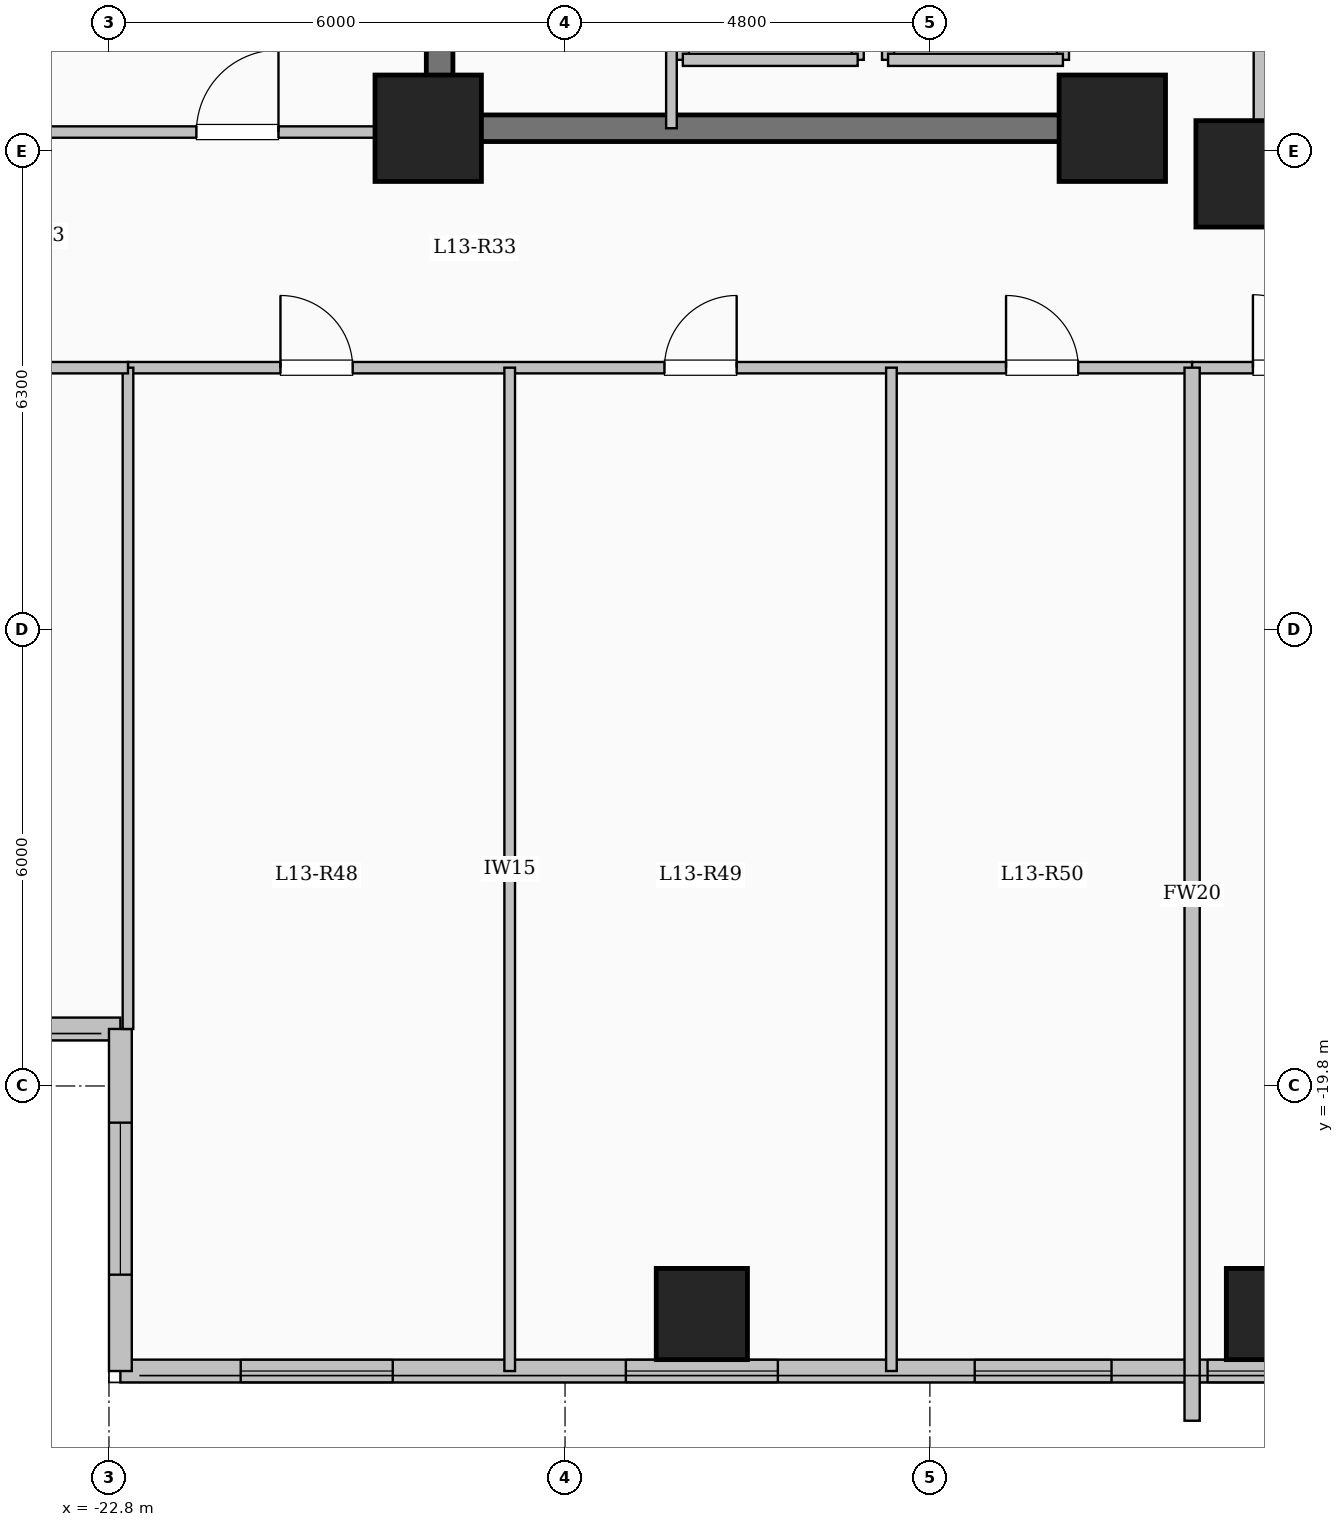
"""IFC4 building model, lengths in metres.
Left out: names, types, materials, properties, quantities, classifications, styles, units other than length and angle.
Written with IfcOpenShell. Run it as: python <this file> out.ifc"""

import sys

from ifc_helpers import new_model, si_unit, direction, frame, frame_2d, origin, origin_2d, place, context, subcontext, project, spatial, rectangle, extrude, element, fill, save


model = new_model("IFC4")
c1 = context("Model", 3, precision=1e-05, world=origin(), true_north=direction((0.0, 1.0)))
c2 = subcontext(c1, "Body", "Model", "MODEL_VIEW")
j1 = project(units=[si_unit("LENGTHUNIT", "METRE"), si_unit("PLANEANGLEUNIT", "RADIAN")], contexts=[c1])
p1 = place(None, origin())
s1 = spatial("IfcSite", under=j1, at=p1, CompositionType="ELEMENT")
p2 = place(p1, origin())
s2 = spatial("IfcBuilding", under=s1, at=p2, CompositionType="ELEMENT")
p3 = place(p2, frame((0.0, 0.0, 50.8)))
s3 = spatial("IfcBuildingStorey", under=s2, at=p3, CompositionType="ELEMENT", Elevation=50.8)
for number, where, z_axis, x_axis in (
    (1, (-7.8, -7.8, 0.0), (0.0, 0.0, 1.0), (1.0, 0.0, 0.0)),
    (2, (-9.6, -7.2, 0.0), (0.0, 0.0, 1.0), (1.0, 0.0, 0.0)),
    (3, (-18.6, -7.2, 0.0), (0.0, 0.0, 1.0), (1.0, 0.0, 0.0)),
):
    element("IfcColumn", number, at=place(p3, frame(where, z_axis=z_axis, x_axis=x_axis)), inside=s3, PredefinedType="COLUMN", context=c2, shape_type="SweptSolid", body=[
        extrude(rectangle(XDim=1.4, YDim=1.4, at=origin_2d()), origin(), (0.0, 0.0, 1.0), 3.35),
    ])
for number, where, z_axis, x_axis in (
    (4, (-15.0, -22.8, 0.0), (0.0, 0.0, 1.0), (1.0, 0.0, 0.0)),
    (5, (-7.5, -22.8, 0.0), (0.0, 0.0, 1.0), (1.0, 0.0, 0.0)),
):
    element("IfcColumn", number, at=place(p3, frame(where, z_axis=z_axis, x_axis=x_axis)), inside=s3, PredefinedType="COLUMN", context=c2, shape_type="SweptSolid", body=[
        extrude(rectangle(XDim=1.2, YDim=1.2, at=origin_2d()), origin(), (0.0, 0.0, 1.0), 3.35),
    ])
p4 = place(p3, frame((-7.62, -7.62, 0.0), z_axis=(0.0, 0.0, 1.0), x_axis=(1.0, 0.0, 0.0)))
e6 = element("IfcWall", 6, at=p4, inside=s3, PredefinedType="SOLIDWALL", context=c2, shape_type="SweptSolid", body=[
    extrude(rectangle(XDim=15.24, YDim=0.24, at=frame_2d((7.62, 0.0))), origin(), (0.0, 0.0, 1.0), 3.1),
])
p5 = place(p4, frame((6.92, 0.0, 0.95)))
e7 = element("IfcOpeningElement", 7, at=p5, cuts=e6, PredefinedType="OPENING", context=c2, shape_type="SweptSolid", body=[
    extrude(rectangle(XDim=1.4, YDim=1.5, at=frame_2d((0.7, 0.75))), frame((0.0, 0.13, 0.0), z_axis=(0.0, -1.0, 0.0), x_axis=(1.0, 0.0, 0.0)), (0.0, 0.0, 1.0), 0.26),
])
p6 = place(p3, frame((-7.62, 7.62, 0.0), z_axis=(0.0, 0.0, 1.0), x_axis=(0.0, -1.0, 0.0)))
e8 = element("IfcWall", 8, at=p6, inside=s3, PredefinedType="SOLIDWALL", context=c2, shape_type="SweptSolid", body=[
    extrude(rectangle(XDim=15.24, YDim=0.24, at=frame_2d((7.62, 0.0))), origin(), (0.0, 0.0, 1.0), 3.1),
])
p7 = place(p6, frame((6.92, 0.0, 0.95)))
e9 = element("IfcOpeningElement", 9, at=p7, cuts=e8, PredefinedType="OPENING", context=c2, shape_type="SweptSolid", body=[
    extrude(rectangle(XDim=1.4, YDim=1.5, at=frame_2d((0.7, 0.75))), frame((0.0, 0.13, 0.0), z_axis=(0.0, -1.0, 0.0), x_axis=(1.0, 0.0, 0.0)), (0.0, 0.0, 1.0), 0.26),
])
p8 = place(p3, frame((-22.65, -19.05, 0.0), z_axis=(0.0, 0.0, 1.0), x_axis=(-1.0, 0.0, 0.0)))
e10 = element("IfcWall", 10, at=p8, inside=s3, PredefinedType="SOLIDWALL", context=c2, shape_type="SweptSolid", body=[
    extrude(rectangle(XDim=6.0, YDim=0.3, at=frame_2d((3.0, 0.0))), origin(), (0.0, 0.0, 1.0), 3.1),
])
p9 = place(p8, frame((1.775, 0.0, 0.9)))
e11 = element("IfcOpeningElement", 11, at=p9, cuts=e10, PredefinedType="OPENING", context=c2, shape_type="SweptSolid", body=[
    extrude(rectangle(XDim=2.4, YDim=1.8, at=frame_2d((1.2, 0.9))), frame((0.0, 0.16, 0.0), z_axis=(0.0, -1.0, 0.0), x_axis=(1.0, 0.0, 0.0)), (0.0, 0.0, 1.0), 0.32),
])
p10 = place(p3, frame((-7.35, -23.55, 0.0), z_axis=(0.0, 0.0, 1.0), x_axis=(-1.0, 0.0, 0.0)))
e12 = element("IfcWall", 12, at=p10, inside=s3, PredefinedType="SOLIDWALL", context=c2, shape_type="SweptSolid", body=[
    extrude(rectangle(XDim=15.3, YDim=0.3, at=frame_2d((7.65, 0.0))), origin(), (0.0, 0.0, 1.0), 3.1),
])
p11 = place(p10, frame((0.147, 0.0, 0.95)))
e13 = element("IfcOpeningElement", 13, at=p11, cuts=e12, PredefinedType="OPENING", context=c2, shape_type="SweptSolid", body=[
    extrude(rectangle(XDim=0.85, YDim=1.5, at=frame_2d((0.425, 0.75))), frame((0.0, 0.16, 0.0), z_axis=(0.0, -1.0, 0.0), x_axis=(1.0, 0.0, 0.0)), (0.0, 0.0, 1.0), 0.32),
])
p12 = place(p10, frame((2.26, 0.0, 0.9)))
e14 = element("IfcOpeningElement", 14, at=p12, cuts=e12, PredefinedType="OPENING", context=c2, shape_type="SweptSolid", body=[
    extrude(rectangle(XDim=1.8, YDim=1.65, at=frame_2d((0.9, 0.825))), frame((0.0, 0.16, 0.0), z_axis=(0.0, -1.0, 0.0), x_axis=(1.0, 0.0, 0.0)), (0.0, 0.0, 1.0), 0.32),
])
p13 = place(p10, frame((6.65, 0.0, 0.9)))
e15 = element("IfcOpeningElement", 15, at=p13, cuts=e12, PredefinedType="OPENING", context=c2, shape_type="SweptSolid", body=[
    extrude(rectangle(XDim=2.0, YDim=1.7, at=frame_2d((1.0, 0.85))), frame((0.0, 0.16, 0.0), z_axis=(0.0, -1.0, 0.0), x_axis=(1.0, 0.0, 0.0)), (0.0, 0.0, 1.0), 0.32),
])
p14 = place(p10, frame((11.717, 0.0, 0.9)))
e16 = element("IfcOpeningElement", 16, at=p14, cuts=e12, PredefinedType="OPENING", context=c2, shape_type="SweptSolid", body=[
    extrude(rectangle(XDim=2.0, YDim=1.7, at=frame_2d((1.0, 0.85))), frame((0.0, 0.16, 0.0), z_axis=(0.0, -1.0, 0.0), x_axis=(1.0, 0.0, 0.0)), (0.0, 0.0, 1.0), 0.32),
])
p15 = place(p3, frame((-22.65, -23.55, 0.0), z_axis=(0.0, 0.0, 1.0), x_axis=(0.0, 1.0, 0.0)))
e17 = element("IfcWall", 17, at=p15, inside=s3, PredefinedType="SOLIDWALL", context=c2, shape_type="SweptSolid", body=[
    extrude(rectangle(XDim=4.5, YDim=0.3, at=frame_2d((2.25, 0.0))), origin(), (0.0, 0.0, 1.0), 3.1),
])
p16 = place(p15, frame((1.268, 0.0, 0.9)))
e18 = element("IfcOpeningElement", 18, at=p16, cuts=e17, PredefinedType="OPENING", context=c2, shape_type="SweptSolid", body=[
    extrude(rectangle(XDim=2.0, YDim=1.7, at=frame_2d((1.0, 0.85))), frame((0.0, 0.16, 0.0), z_axis=(0.0, -1.0, 0.0), x_axis=(1.0, 0.0, 0.0)), (0.0, 0.0, 1.0), 0.32),
])
p17 = place(p3, frame((-12.55, -6.3, 0.0), z_axis=(0.0, 0.0, 1.0), x_axis=(0.0, 1.0, 0.0)))
e19 = element("IfcWall", 19, at=p17, inside=s3, PredefinedType="SOLIDWALL", context=c2, shape_type="SweptSolid", body=[
    extrude(rectangle(XDim=2.6, YDim=0.16, at=frame_2d((1.3, 0.0))), origin(), (0.0, 0.0, 1.0), 3.1),
])
p18 = place(p3, frame((-10.25, -6.3, 0.0), z_axis=(0.0, 0.0, 1.0), x_axis=(0.0, 1.0, 0.0)))
e20 = element("IfcWall", 20, at=p18, inside=s3, PredefinedType="SOLIDWALL", context=c2, shape_type="SweptSolid", body=[
    extrude(rectangle(XDim=2.6, YDim=0.16, at=frame_2d((1.3, 0.0))), origin(), (0.0, 0.0, 1.0), 3.1),
])
p19 = place(p18, frame((0.75, 0.0, 0.0)))
e21 = element("IfcOpeningElement", 21, at=p19, cuts=e20, PredefinedType="OPENING", context=c2, shape_type="SweptSolid", body=[
    extrude(rectangle(XDim=1.1, YDim=2.15, at=frame_2d((0.55, 1.075))), frame((0.0, 0.09, 0.0), z_axis=(0.0, -1.0, 0.0), x_axis=(1.0, 0.0, 0.0)), (0.0, 0.0, 1.0), 0.18),
])
p20 = place(p3, frame((-12.55, -6.3, 0.0), z_axis=(0.0, 0.0, 1.0), x_axis=(1.0, 0.0, 0.0)))
e22 = element("IfcWall", 22, at=p20, inside=s3, PredefinedType="SOLIDWALL", context=c2, shape_type="SweptSolid", body=[
    extrude(rectangle(XDim=2.3, YDim=0.16, at=frame_2d((1.15, 0.0))), origin(), (0.0, 0.0, 1.0), 3.1),
])
for number, where, z_axis, x_axis in (
    (23, (-15.25, -6.3, 0.0), (0.0, 0.0, 1.0), (0.0, 1.0, 0.0)),
    (24, (-12.95, -6.3, 0.0), (0.0, 0.0, 1.0), (0.0, 1.0, 0.0)),
):
    element("IfcWall", number, at=place(p3, frame(where, z_axis=z_axis, x_axis=x_axis)), inside=s3, PredefinedType="SOLIDWALL", context=c2, shape_type="SweptSolid", body=[
        extrude(rectangle(XDim=2.6, YDim=0.16, at=frame_2d((1.3, 0.0))), origin(), (0.0, 0.0, 1.0), 3.1),
    ])
p21 = place(p3, frame((-15.25, -6.3, 0.0), z_axis=(0.0, 0.0, 1.0), x_axis=(1.0, 0.0, 0.0)))
e25 = element("IfcWall", 25, at=p21, inside=s3, PredefinedType="SOLIDWALL", context=c2, shape_type="SweptSolid", body=[
    extrude(rectangle(XDim=2.3, YDim=0.16, at=frame_2d((1.15, 0.0))), origin(), (0.0, 0.0, 1.0), 3.1),
])
p22 = place(p3, frame((-18.45, -7.375, 0.0), z_axis=(0.0, 0.0, 1.0), x_axis=(0.0, 1.0, 0.0)))
e26 = element("IfcWall", 26, at=p22, inside=s3, PredefinedType="SHEAR", context=c2, shape_type="SweptSolid", body=[
    extrude(rectangle(XDim=14.05, YDim=0.35, at=frame_2d((7.025, 0.0))), origin(), (0.0, 0.0, 1.0), 3.35),
])
p23 = place(p3, frame((-18.625, -7.2, 0.0), z_axis=(0.0, 0.0, 1.0), x_axis=(1.0, 0.0, 0.0)))
e27 = element("IfcWall", 27, at=p23, inside=s3, PredefinedType="SHEAR", context=c2, shape_type="SweptSolid", body=[
    extrude(rectangle(XDim=8.55, YDim=0.35, at=frame_2d((4.275, 0.0))), origin(), (0.0, 0.0, 1.0), 3.35),
])
p24 = place(p3, frame((-15.4, -7.2, 0.0), z_axis=(0.0, 0.0, 1.0), x_axis=(0.0, 1.0, 0.0)))
e28 = element("IfcWall", 28, at=p24, inside=s3, PredefinedType="PARTITIONING", context=c2, shape_type="SweptSolid", body=[
    extrude(rectangle(XDim=10.45, YDim=0.14, at=frame_2d((5.225, 0.0))), origin(), (0.0, 0.0, 1.0), 3.1),
])
p25 = place(p24, frame((9.25, 0.0, 0.0)))
e29 = element("IfcOpeningElement", 29, at=p25, cuts=e28, PredefinedType="OPENING", context=c2, shape_type="SweptSolid", body=[
    extrude(rectangle(XDim=0.9, YDim=2.08, at=frame_2d((0.45, 1.04))), frame((0.0, 0.08, 0.0), z_axis=(0.0, -1.0, 0.0), x_axis=(1.0, 0.0, 0.0)), (0.0, 0.0, 1.0), 0.16),
])
p26 = place(p3, frame((-22.55, -10.35, 0.0), z_axis=(0.0, 0.0, 1.0), x_axis=(1.0, 0.0, 0.0)))
e30 = element("IfcWall", 30, at=p26, inside=s3, PredefinedType="PARTITIONING", context=c2, shape_type="SweptSolid", body=[
    extrude(rectangle(XDim=14.0, YDim=0.15, at=frame_2d((7.0, 0.0))), origin(), (0.0, 0.0, 1.0), 3.1),
])
p27 = place(p26, frame((2.006, 0.0, 0.0)))
e31 = element("IfcOpeningElement", 31, at=p27, cuts=e30, PredefinedType="OPENING", context=c2, shape_type="SweptSolid", body=[
    extrude(rectangle(XDim=0.95, YDim=2.15, at=frame_2d((0.475, 1.075))), frame((0.0, 0.085, 0.0), z_axis=(0.0, -1.0, 0.0), x_axis=(1.0, 0.0, 0.0)), (0.0, 0.0, 1.0), 0.17),
])
p28 = place(p26, frame((7.058, 0.0, 0.0)))
e32 = element("IfcOpeningElement", 32, at=p28, cuts=e30, PredefinedType="OPENING", context=c2, shape_type="SweptSolid", body=[
    extrude(rectangle(XDim=0.95, YDim=2.15, at=frame_2d((0.475, 1.075))), frame((0.0, 0.085, 0.0), z_axis=(0.0, -1.0, 0.0), x_axis=(1.0, 0.0, 0.0)), (0.0, 0.0, 1.0), 0.17),
])
p29 = place(p26, frame((11.552, 0.0, 0.0)))
e33 = element("IfcOpeningElement", 33, at=p29, cuts=e30, PredefinedType="OPENING", context=c2, shape_type="SweptSolid", body=[
    extrude(rectangle(XDim=0.95, YDim=2.15, at=frame_2d((0.475, 1.075))), frame((0.0, 0.085, 0.0), z_axis=(0.0, -1.0, 0.0), x_axis=(1.0, 0.0, 0.0)), (0.0, 0.0, 1.0), 0.17),
])
p30 = place(p3, frame((-8.55, -10.35, 0.0), z_axis=(0.0, 0.0, 1.0), x_axis=(1.0, 0.0, 0.0)))
e34 = element("IfcWall", 34, at=p30, inside=s3, PredefinedType="PARTITIONING", context=c2, shape_type="SweptSolid", body=[
    extrude(rectangle(XDim=17.1, YDim=0.15, at=frame_2d((8.55, 0.0))), origin(), (0.0, 0.0, 1.0), 3.1),
])
p31 = place(p30, frame((0.8, 0.0, 0.0)))
e35 = element("IfcOpeningElement", 35, at=p31, cuts=e34, PredefinedType="OPENING", context=c2, shape_type="SweptSolid", body=[
    extrude(rectangle(XDim=0.96, YDim=2.15, at=frame_2d((0.48, 1.075))), frame((0.0, 0.085, 0.0), z_axis=(0.0, -1.0, 0.0), x_axis=(1.0, 0.0, 0.0)), (0.0, 0.0, 1.0), 0.17),
])
for number, where, z_axis, x_axis in (
    (36, (-17.528, -23.55, 0.0), (0.0, 0.0, 1.0), (0.0, 1.0, 0.0)),
    (37, (-12.506, -23.55, 0.0), (0.0, 0.0, 1.0), (0.0, 1.0, 0.0)),
):
    element("IfcWall", number, at=place(p3, frame(where, z_axis=z_axis, x_axis=x_axis)), inside=s3, PredefinedType="PARTITIONING", context=c2, shape_type="SweptSolid", body=[
        extrude(rectangle(XDim=13.2, YDim=0.14, at=frame_2d((6.6, 0.0))), origin(), (0.0, 0.0, 1.0), 3.1),
    ])
p32 = place(p3, frame((-8.55, -24.204, 0.0), z_axis=(0.0, 0.0, 1.0), x_axis=(0.0, 1.0, 0.0)))
e38 = element("IfcWall", 38, at=p32, inside=s3, PredefinedType="SOLIDWALL", context=c2, shape_type="SweptSolid", body=[
    extrude(rectangle(XDim=13.854, YDim=0.2, at=frame_2d((6.927, 0.0))), origin(), (0.0, 0.0, 1.0), 3.1),
])
p33 = place(p3, frame((-28.68, -7.25, 0.0), z_axis=(0.0, 0.0, 1.0), x_axis=(1.0, 0.0, 0.0)))
e39 = element("IfcWall", 39, at=p33, inside=s3, PredefinedType="PARTITIONING", context=c2, shape_type="SweptSolid", body=[
    extrude(rectangle(XDim=10.23, YDim=0.15, at=frame_2d((5.115, 0.0))), origin(), (0.0, 0.0, 1.0), 3.1),
])
p34 = place(p33, frame((7.03, 0.0, 0.0)))
e40 = element("IfcOpeningElement", 40, at=p34, cuts=e39, PredefinedType="OPENING", context=c2, shape_type="SweptSolid", body=[
    extrude(rectangle(XDim=1.08, YDim=2.15, at=frame_2d((0.54, 1.075))), frame((0.0, 0.085, 0.0), z_axis=(0.0, -1.0, 0.0), x_axis=(1.0, 0.0, 0.0)), (0.0, 0.0, 1.0), 0.17),
])
p35 = place(p3, frame((-22.55, -19.05, 0.0), z_axis=(0.0, 0.0, 1.0), x_axis=(0.0, 1.0, 0.0)))
e41 = element("IfcWall", 41, at=p35, inside=s3, PredefinedType="PARTITIONING", context=c2, shape_type="SweptSolid", body=[
    extrude(rectangle(XDim=8.7, YDim=0.14, at=frame_2d((4.35, 0.0))), origin(), (0.0, 0.0, 1.0), 3.1),
])
p36 = place(p3, frame((-28.68, -10.35, 0.0), z_axis=(0.0, 0.0, 1.0), x_axis=(1.0, 0.0, 0.0)))
e42 = element("IfcWall", 42, at=p36, inside=s3, PredefinedType="PARTITIONING", context=c2, shape_type="SweptSolid", body=[
    extrude(rectangle(XDim=6.13, YDim=0.15, at=frame_2d((3.065, 0.0))), origin(), (0.0, 0.0, 1.0), 3.1),
])
p37 = place(p36, frame((2.59, 0.0, 0.0)))
e43 = element("IfcOpeningElement", 43, at=p37, cuts=e42, PredefinedType="OPENING", context=c2, shape_type="SweptSolid", body=[
    extrude(rectangle(XDim=0.95, YDim=2.15, at=frame_2d((0.475, 1.075))), frame((0.0, 0.085, 0.0), z_axis=(0.0, -1.0, 0.0), x_axis=(1.0, 0.0, 0.0)), (0.0, 0.0, 1.0), 0.17),
])
p38 = place(p11, origin())
e44 = element("IfcWindow", 44, at=p38, inside=s3, PartitioningType="SINGLE_PANEL", PredefinedType="WINDOW", context=c2, shape_type="SweptSolid", body=[
    extrude(rectangle(XDim=0.85, YDim=1.5, at=frame_2d((0.425, 0.75))), frame((0.0, 0.03, 0.0), z_axis=(0.0, -1.0, 0.0), x_axis=(1.0, 0.0, 0.0)), (0.0, 0.0, 1.0), 0.06),
])
fill(e13, e44)
p39 = place(p12, origin())
e45 = element("IfcWindow", 45, at=p39, inside=s3, PartitioningType="SINGLE_PANEL", PredefinedType="WINDOW", context=c2, shape_type="SweptSolid", body=[
    extrude(rectangle(XDim=1.8, YDim=1.65, at=frame_2d((0.9, 0.825))), frame((0.0, 0.03, 0.0), z_axis=(0.0, -1.0, 0.0), x_axis=(1.0, 0.0, 0.0)), (0.0, 0.0, 1.0), 0.06),
])
fill(e14, e45)
p40 = place(p13, origin())
e46 = element("IfcWindow", 46, at=p40, inside=s3, PartitioningType="SINGLE_PANEL", PredefinedType="WINDOW", context=c2, shape_type="SweptSolid", body=[
    extrude(rectangle(XDim=2.0, YDim=1.7, at=frame_2d((1.0, 0.85))), frame((0.0, 0.03, 0.0), z_axis=(0.0, -1.0, 0.0), x_axis=(1.0, 0.0, 0.0)), (0.0, 0.0, 1.0), 0.06),
])
fill(e15, e46)
p41 = place(p14, origin())
e47 = element("IfcWindow", 47, at=p41, inside=s3, PartitioningType="SINGLE_PANEL", PredefinedType="WINDOW", context=c2, shape_type="SweptSolid", body=[
    extrude(rectangle(XDim=2.0, YDim=1.7, at=frame_2d((1.0, 0.85))), frame((0.0, 0.03, 0.0), z_axis=(0.0, -1.0, 0.0), x_axis=(1.0, 0.0, 0.0)), (0.0, 0.0, 1.0), 0.06),
])
fill(e16, e47)
p42 = place(p16, origin())
e48 = element("IfcWindow", 48, at=p42, inside=s3, PartitioningType="SINGLE_PANEL", PredefinedType="WINDOW", context=c2, shape_type="SweptSolid", body=[
    extrude(rectangle(XDim=2.0, YDim=1.7, at=frame_2d((1.0, 0.85))), frame((0.0, 0.03, 0.0), z_axis=(0.0, -1.0, 0.0), x_axis=(1.0, 0.0, 0.0)), (0.0, 0.0, 1.0), 0.06),
])
fill(e18, e48)
p43 = place(p27, origin())
e49 = element("IfcDoor", 49, at=p43, inside=s3, OperationType="SINGLE_SWING_LEFT", PredefinedType="DOOR", context=c2, shape_type="SweptSolid", body=[
    extrude(rectangle(XDim=0.95, YDim=2.15, at=frame_2d((0.475, 1.075))), frame((0.0, 0.025, 0.0), z_axis=(0.0, -1.0, 0.0), x_axis=(1.0, 0.0, 0.0)), (0.0, 0.0, 1.0), 0.05),
])
fill(e31, e49)
p44 = place(p28, origin())
e50 = element("IfcDoor", 50, at=p44, inside=s3, OperationType="SINGLE_SWING_RIGHT", PredefinedType="DOOR", context=c2, shape_type="SweptSolid", body=[
    extrude(rectangle(XDim=0.95, YDim=2.15, at=frame_2d((0.475, 1.075))), frame((0.0, 0.025, 0.0), z_axis=(0.0, -1.0, 0.0), x_axis=(1.0, 0.0, 0.0)), (0.0, 0.0, 1.0), 0.05),
])
fill(e32, e50)
p45 = place(p29, origin())
e51 = element("IfcDoor", 51, at=p45, inside=s3, OperationType="SINGLE_SWING_LEFT", PredefinedType="DOOR", context=c2, shape_type="SweptSolid", body=[
    extrude(rectangle(XDim=0.95, YDim=2.15, at=frame_2d((0.475, 1.075))), frame((0.0, 0.025, 0.0), z_axis=(0.0, -1.0, 0.0), x_axis=(1.0, 0.0, 0.0)), (0.0, 0.0, 1.0), 0.05),
])
fill(e33, e51)
p46 = place(p31, origin())
e52 = element("IfcDoor", 52, at=p46, inside=s3, OperationType="SINGLE_SWING_LEFT", PredefinedType="DOOR", context=c2, shape_type="SweptSolid", body=[
    extrude(rectangle(XDim=0.96, YDim=2.15, at=frame_2d((0.48, 1.075))), frame((0.0, 0.025, 0.0), z_axis=(0.0, -1.0, 0.0), x_axis=(1.0, 0.0, 0.0)), (0.0, 0.0, 1.0), 0.05),
])
fill(e35, e52)
p47 = place(p34, origin())
e53 = element("IfcDoor", 53, at=p47, inside=s3, OperationType="SINGLE_SWING_RIGHT", PredefinedType="DOOR", context=c2, shape_type="SweptSolid", body=[
    extrude(rectangle(XDim=1.08, YDim=2.15, at=frame_2d((0.54, 1.075))), frame((0.0, 0.025, 0.0), z_axis=(0.0, -1.0, 0.0), x_axis=(1.0, 0.0, 0.0)), (0.0, 0.0, 1.0), 0.05),
])
fill(e40, e53)
save(model, sys.argv[1])
